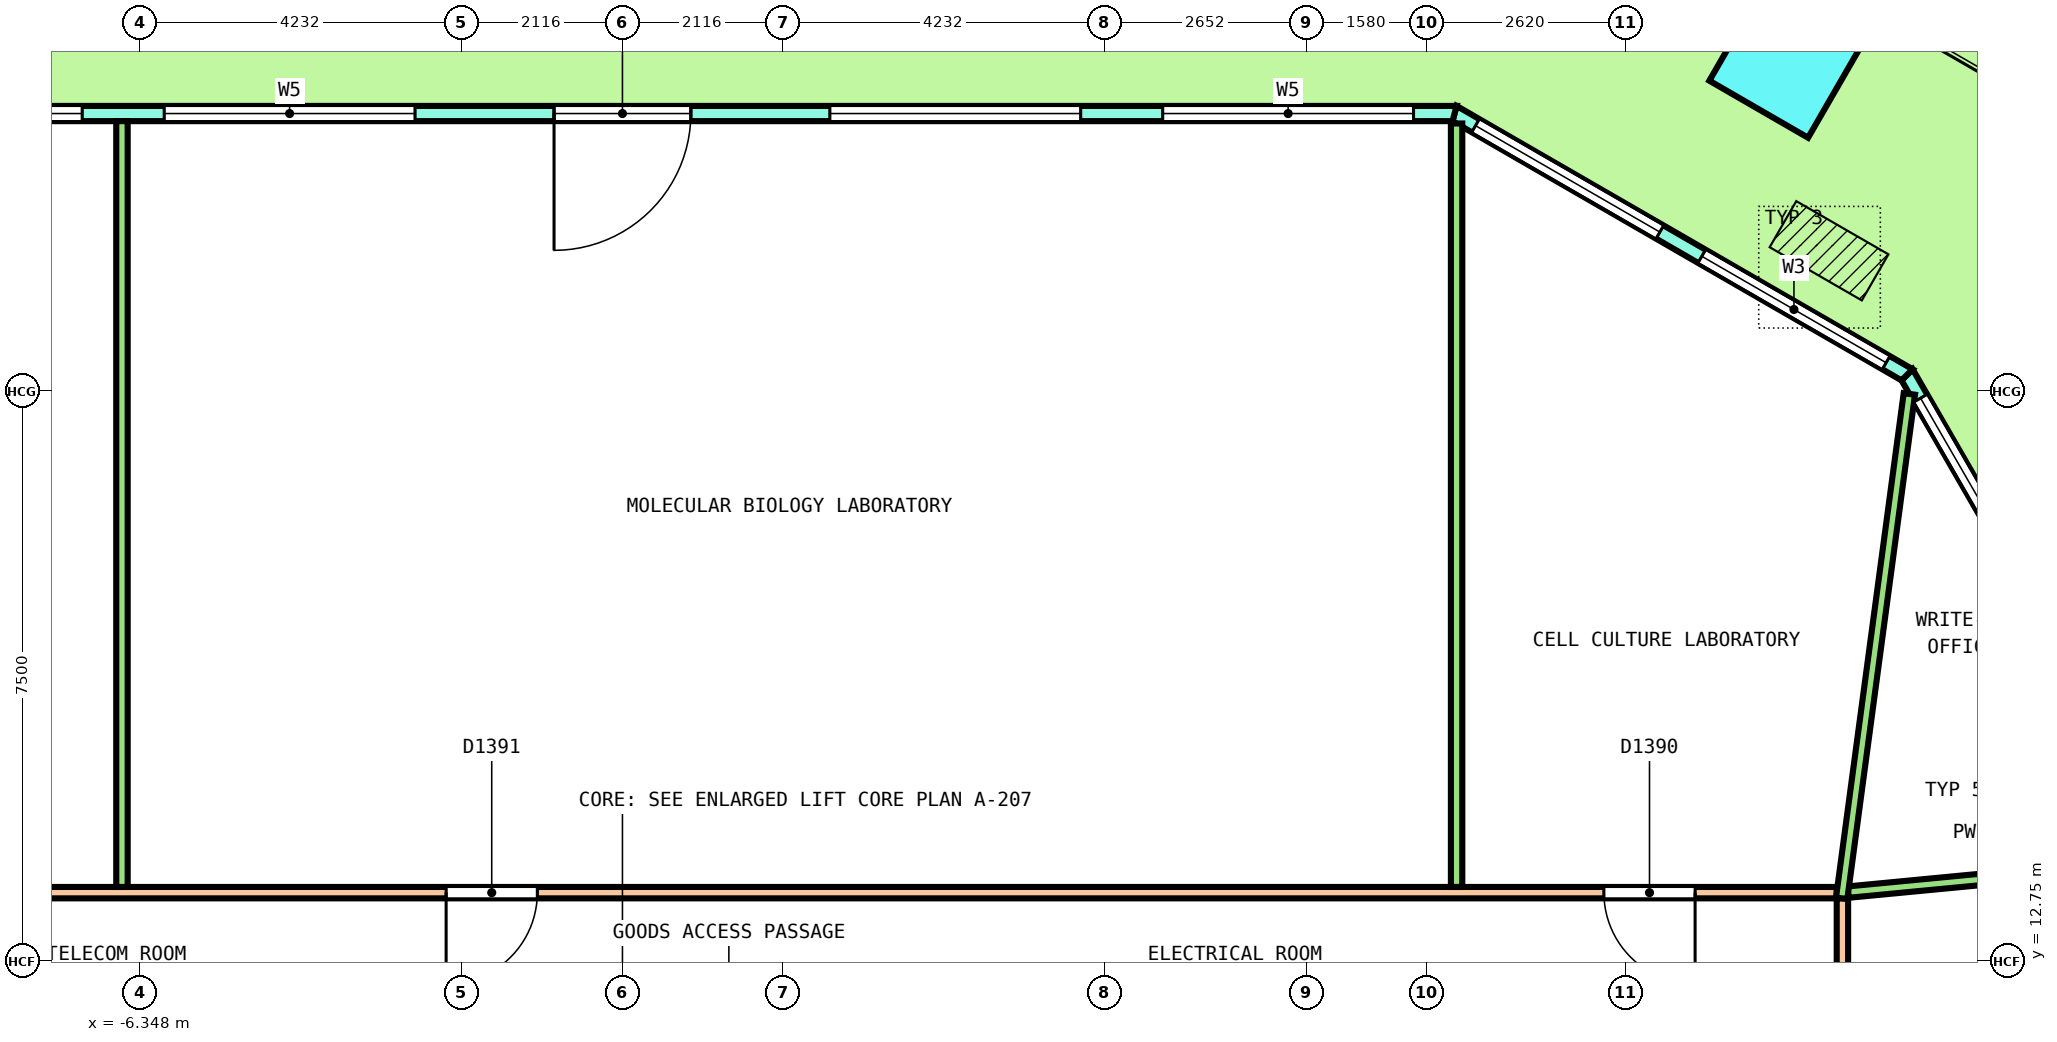
"""IFC4 building model, lengths in metres.
Left out: names, types, materials, properties, quantities, classifications, styles, units other than length and angle.
Written with IfcOpenShell. Run it as: python <this file> out.ifc"""

import sys

from ifc_helpers import new_model, si_unit, direction, frame, frame_2d, origin, origin_2d, place, context, subcontext, project, spatial, polyline, rectangle, outline, extrude, element, fill, save


model = new_model("IFC4")
c1 = context("Model", 3, precision=1e-05, world=origin(), true_north=direction((0.0, 1.0)))
c2 = subcontext(c1, "Body", "Model", "MODEL_VIEW")
j1 = project(units=[si_unit("LENGTHUNIT", "METRE"), si_unit("PLANEANGLEUNIT", "RADIAN")], contexts=[c1])
p1 = place(None, origin())
s1 = spatial("IfcSite", under=j1, at=p1, CompositionType="ELEMENT")
p2 = place(p1, origin())
s2 = spatial("IfcBuilding", under=s1, at=p2, CompositionType="ELEMENT")
p3 = place(p2, frame((0.0, 0.0, 45.4)))
s3 = spatial("IfcBuildingStorey", under=s2, at=p3, CompositionType="ELEMENT", Elevation=45.4)
p4 = place(p3, frame((15.324, 24.606, 0.0), z_axis=(0.036205074038, 0.0, 0.999344381389), x_axis=(-0.865315435316, 0.500246354177, 0.031349362627)))
e1 = element("IfcColumn", 1, at=p4, inside=s3, PredefinedType="COLUMN", context=c2, shape_type="SweptSolid", body=[
    extrude(rectangle(XDim=1.5, YDim=1.5, at=origin_2d()), origin(), (0.0, 0.0, 1.0), 4.053),
])
p5 = place(p3, frame((26.172, 4.405, 0.0), z_axis=(0.0, 0.0, 1.0), x_axis=(-0.500000942564, 0.866024859594, 0.0)))
e2 = element("IfcWall", 2, at=p5, inside=s3, PredefinedType="SOLIDWALL", context=c2, shape_type="SweptSolid", body=[
    extrude(outline(polyline([(-0.027, -0.1), (1.006, -0.1), (2.039, -0.1), (3.072, -0.1), (4.105, -0.1), (5.138, -0.1), (6.172, -0.1), (7.205, -0.1), (8.238, -0.1), (9.271, -0.1), (10.304, -0.1), (11.337, -0.1), (12.37, -0.1), (13.403, -0.1), (14.436, -0.1), (15.469, -0.1), (16.502, -0.1), (17.535, -0.1), (18.568, -0.1), (18.515, 0.1), (17.488, 0.1), (16.46, 0.1), (15.433, 0.1), (14.406, 0.1), (13.379, 0.1), (12.352, 0.1), (11.325, 0.1), (10.298, 0.1), (9.271, 0.1), (8.244, 0.1), (7.217, 0.1), (6.189, 0.1), (5.162, 0.1), (4.135, 0.1), (3.108, 0.1), (2.081, 0.1), (1.054, 0.1), (0.027, 0.1), (-0.027, -0.1)])), origin(), (0.0, 0.0, 1.0), 4.1),
])
p6 = place(p5, frame((0.354, 0.0, 0.1)))
e3 = element("IfcOpeningElement", 3, at=p6, cuts=e2, PredefinedType="OPENING", context=c2, shape_type="SweptSolid", body=[
    extrude(rectangle(XDim=3.0, YDim=2.9, at=frame_2d((1.5, 1.45))), frame((0.0, 0.11, 0.0), z_axis=(0.0, -1.0, 0.0), x_axis=(1.0, 0.0, 0.0)), (0.0, 0.0, 1.0), 0.22),
])
p7 = place(p5, frame((4.062, 0.0, 0.1)))
e4 = element("IfcOpeningElement", 4, at=p7, cuts=e2, PredefinedType="OPENING", context=c2, shape_type="SweptSolid", body=[
    extrude(rectangle(XDim=3.0, YDim=2.9, at=frame_2d((1.5, 1.45))), frame((0.0, 0.11, 0.0), z_axis=(0.0, -1.0, 0.0), x_axis=(1.0, 0.0, 0.0)), (0.0, 0.0, 1.0), 0.22),
])
p8 = place(p5, frame((8.371, 0.0, 0.0)))
e5 = element("IfcOpeningElement", 5, at=p8, cuts=e2, PredefinedType="OPENING", context=c2, shape_type="SweptSolid", body=[
    extrude(rectangle(XDim=1.8, YDim=2.4, at=frame_2d((0.9, 1.2))), frame((0.0, 0.11, 0.0), z_axis=(0.0, -1.0, 0.0), x_axis=(1.0, 0.0, 0.0)), (0.0, 0.0, 1.0), 0.22),
])
p9 = place(p5, frame((8.371, 0.0, 2.55)))
e6 = element("IfcOpeningElement", 6, at=p9, cuts=e2, PredefinedType="OPENING", context=c2, shape_type="SweptSolid", body=[
    extrude(rectangle(XDim=1.8, YDim=0.45, at=frame_2d((0.9, 0.225))), frame((0.0, 0.11, 0.0), z_axis=(0.0, -1.0, 0.0), x_axis=(1.0, 0.0, 0.0)), (0.0, 0.0, 1.0), 0.22),
])
p10 = place(p5, frame((11.479, 0.0, 0.1)))
e7 = element("IfcOpeningElement", 7, at=p10, cuts=e2, PredefinedType="OPENING", context=c2, shape_type="SweptSolid", body=[
    extrude(rectangle(XDim=3.0, YDim=2.9, at=frame_2d((1.5, 1.45))), frame((0.0, 0.11, 0.0), z_axis=(0.0, -1.0, 0.0), x_axis=(1.0, 0.0, 0.0)), (0.0, 0.0, 1.0), 0.22),
])
p11 = place(p5, frame((15.188, 0.0, 0.1)))
e8 = element("IfcOpeningElement", 8, at=p11, cuts=e2, PredefinedType="OPENING", context=c2, shape_type="SweptSolid", body=[
    extrude(rectangle(XDim=3.0, YDim=2.9, at=frame_2d((1.5, 1.45))), frame((0.0, 0.11, 0.0), z_axis=(0.0, -1.0, 0.0), x_axis=(1.0, 0.0, 0.0)), (0.0, 0.0, 1.0), 0.22),
])
p12 = place(p3, frame((16.901, 20.463, 0.0), z_axis=(0.0, 0.0, 1.0), x_axis=(-0.866029458321, 0.49999297727, 0.0)))
e9 = element("IfcWall", 9, at=p12, inside=s3, PredefinedType="SOLIDWALL", context=c2, shape_type="SweptSolid", body=[
    extrude(outline(polyline([(-0.027, -0.1), (1.128, -0.1), (2.282, -0.1), (3.437, -0.1), (4.592, -0.1), (5.747, -0.1), (6.901, -0.1), (6.848, 0.1), (5.711, 0.1), (4.574, 0.1), (3.437, 0.1), (2.301, 0.1), (1.164, 0.1), (0.027, 0.1), (-0.027, -0.1)])), origin(), (0.0, 0.0, 1.0), 4.1),
])
p13 = place(p12, frame((0.319, 0.0, 0.1)))
e10 = element("IfcOpeningElement", 10, at=p13, cuts=e9, PredefinedType="OPENING", context=c2, shape_type="SweptSolid", body=[
    extrude(rectangle(XDim=2.8, YDim=2.9, at=frame_2d((1.4, 1.45))), frame((0.0, 0.11, 0.0), z_axis=(0.0, -1.0, 0.0), x_axis=(1.0, 0.0, 0.0)), (0.0, 0.0, 1.0), 0.22),
])
p14 = place(p12, frame((3.756, 0.0, 0.1)))
e11 = element("IfcOpeningElement", 11, at=p14, cuts=e9, PredefinedType="OPENING", context=c2, shape_type="SweptSolid", body=[
    extrude(rectangle(XDim=2.8, YDim=2.9, at=frame_2d((1.4, 1.45))), frame((0.0, 0.11, 0.0), z_axis=(0.0, -1.0, 0.0), x_axis=(1.0, 0.0, 0.0)), (0.0, 0.0, 1.0), 0.22),
])
p15 = place(p3, frame((10.947, 23.9, 0.0), z_axis=(0.0, 0.0, 1.0), x_axis=(-1.0, 0.0, 0.0)))
e12 = element("IfcWall", 12, at=p15, inside=s3, PredefinedType="SOLIDWALL", context=c2, shape_type="SweptSolid", body=[
    extrude(outline(polyline([(-0.027, -0.1), (1.018, -0.1), (2.063, -0.1), (3.109, -0.1), (4.154, -0.1), (5.199, -0.1), (6.244, -0.1), (7.289, -0.1), (8.334, -0.1), (9.38, -0.1), (10.425, -0.1), (11.47, -0.1), (12.515, -0.1), (13.56, -0.1), (14.605, -0.1), (15.65, -0.1), (16.696, -0.1), (17.741, -0.1), (18.786, -0.1), (19.831, -0.1), (20.876, -0.1), (21.921, -0.1), (21.868, 0.1), (20.828, 0.1), (19.788, 0.1), (18.748, 0.1), (17.708, 0.1), (16.667, 0.1), (15.627, 0.1), (14.587, 0.1), (13.547, 0.1), (12.507, 0.1), (11.467, 0.1), (10.427, 0.1), (9.387, 0.1), (8.347, 0.1), (7.307, 0.1), (6.267, 0.1), (5.227, 0.1), (4.187, 0.1), (3.147, 0.1), (2.107, 0.1), (1.067, 0.1), (0.027, 0.1), (-0.027, -0.1)])), origin(), (0.0, 0.0, 1.0), 4.1),
])
p16 = place(p15, frame((0.54, 0.0, 0.1)))
e13 = element("IfcOpeningElement", 13, at=p16, cuts=e12, PredefinedType="OPENING", context=c2, shape_type="SweptSolid", body=[
    extrude(rectangle(XDim=3.3, YDim=2.9, at=frame_2d((1.65, 1.45))), frame((0.0, 0.11, 0.0), z_axis=(0.0, -1.0, 0.0), x_axis=(1.0, 0.0, 0.0)), (0.0, 0.0, 1.0), 0.22),
])
p17 = place(p15, frame((4.918, 0.0, 0.1)))
e14 = element("IfcOpeningElement", 14, at=p17, cuts=e12, PredefinedType="OPENING", context=c2, shape_type="SweptSolid", body=[
    extrude(rectangle(XDim=3.3, YDim=2.9, at=frame_2d((1.65, 1.45))), frame((0.0, 0.11, 0.0), z_axis=(0.0, -1.0, 0.0), x_axis=(1.0, 0.0, 0.0)), (0.0, 0.0, 1.0), 0.22),
])
p18 = place(p15, frame((10.047, 0.0, 0.0)))
e15 = element("IfcOpeningElement", 15, at=p18, cuts=e12, PredefinedType="OPENING", context=c2, shape_type="SweptSolid", body=[
    extrude(rectangle(XDim=1.8, YDim=2.4, at=frame_2d((0.9, 1.2))), frame((0.0, 0.11, 0.0), z_axis=(0.0, -1.0, 0.0), x_axis=(1.0, 0.0, 0.0)), (0.0, 0.0, 1.0), 0.22),
])
p19 = place(p15, frame((10.047, 0.0, 2.55)))
e16 = element("IfcOpeningElement", 16, at=p19, cuts=e12, PredefinedType="OPENING", context=c2, shape_type="SweptSolid", body=[
    extrude(rectangle(XDim=1.8, YDim=0.45, at=frame_2d((0.9, 0.225))), frame((0.0, 0.11, 0.0), z_axis=(0.0, -1.0, 0.0), x_axis=(1.0, 0.0, 0.0)), (0.0, 0.0, 1.0), 0.22),
])
p20 = place(p15, frame((13.676, 0.0, 0.1)))
e17 = element("IfcOpeningElement", 17, at=p20, cuts=e12, PredefinedType="OPENING", context=c2, shape_type="SweptSolid", body=[
    extrude(rectangle(XDim=3.3, YDim=2.9, at=frame_2d((1.65, 1.45))), frame((0.0, 0.11, 0.0), z_axis=(0.0, -1.0, 0.0), x_axis=(1.0, 0.0, 0.0)), (0.0, 0.0, 1.0), 0.22),
])
p21 = place(p15, frame((18.055, 0.0, 0.1)))
e18 = element("IfcOpeningElement", 18, at=p21, cuts=e12, PredefinedType="OPENING", context=c2, shape_type="SweptSolid", body=[
    extrude(rectangle(XDim=3.3, YDim=2.9, at=frame_2d((1.65, 1.45))), frame((0.0, 0.11, 0.0), z_axis=(0.0, -1.0, 0.0), x_axis=(1.0, 0.0, 0.0)), (0.0, 0.0, 1.0), 0.22),
])
p22 = place(p3, frame((16.05, -13.575, 0.0), z_axis=(0.0, 0.0, 1.0), x_axis=(0.0, 1.0, 0.0)))
e19 = element("IfcWall", 19, at=p22, inside=s3, PredefinedType="PARTITIONING", context=c2, shape_type="SweptSolid", body=[
    extrude(rectangle(XDim=27.15, YDim=0.15, at=frame_2d((13.575, 0.0))), origin(), (0.0, 0.0, 1.0), 3.05),
])
p23 = place(p22, frame((17.285, 0.0, 0.0)))
e20 = element("IfcOpeningElement", 20, at=p23, cuts=e19, PredefinedType="OPENING", context=c2, shape_type="SweptSolid", body=[
    extrude(rectangle(XDim=1.2, YDim=2.1, at=frame_2d((0.6, 1.05))), frame((0.0, 0.085, 0.0), z_axis=(0.0, -1.0, 0.0), x_axis=(1.0, 0.0, 0.0)), (0.0, 0.0, 1.0), 0.17),
])
p24 = place(p22, frame((23.726, 0.0, 0.0)))
e21 = element("IfcOpeningElement", 21, at=p24, cuts=e19, PredefinedType="OPENING", context=c2, shape_type="SweptSolid", body=[
    extrude(rectangle(XDim=1.0, YDim=2.1, at=frame_2d((0.5, 1.05))), frame((0.0, 0.085, 0.0), z_axis=(0.0, -1.0, 0.0), x_axis=(1.0, 0.0, 0.0)), (0.0, 0.0, 1.0), 0.17),
])
p25 = place(p22, frame((1.2, 0.0, 0.0)))
e22 = element("IfcOpeningElement", 22, at=p25, cuts=e19, PredefinedType="OPENING", context=c2, shape_type="SweptSolid", body=[
    extrude(rectangle(XDim=1.0, YDim=2.1, at=frame_2d((0.5, 1.05))), frame((0.0, 0.085, 0.0), z_axis=(0.0, -1.0, 0.0), x_axis=(1.0, 0.0, 0.0)), (0.0, 0.0, 1.0), 0.17),
])
p26 = place(p22, frame((10.701, 0.0, 0.0)))
e23 = element("IfcOpeningElement", 23, at=p26, cuts=e19, PredefinedType="OPENING", context=c2, shape_type="SweptSolid", body=[
    extrude(rectangle(XDim=1.2, YDim=2.1, at=frame_2d((0.6, 1.05))), frame((0.0, 0.085, 0.0), z_axis=(0.0, -1.0, 0.0), x_axis=(1.0, 0.0, 0.0)), (0.0, 0.0, 1.0), 0.17),
])
p27 = place(p3, frame((-15.975, 13.65, 0.0), z_axis=(0.0, 0.0, 1.0), x_axis=(1.0, 0.0, 0.0)))
e24 = element("IfcWall", 24, at=p27, inside=s3, PredefinedType="PARTITIONING", context=c2, shape_type="SweptSolid", body=[
    extrude(rectangle(XDim=31.95, YDim=0.15, at=frame_2d((15.975, 0.0))), origin(), (0.0, 0.0, 1.0), 3.05),
])
p28 = place(p27, frame((28.887, 0.0, 0.0)))
e25 = element("IfcOpeningElement", 25, at=p28, cuts=e24, PredefinedType="OPENING", context=c2, shape_type="SweptSolid", body=[
    extrude(rectangle(XDim=1.2, YDim=2.1, at=frame_2d((0.6, 1.05))), frame((0.0, 0.085, 0.0), z_axis=(0.0, -1.0, 0.0), x_axis=(1.0, 0.0, 0.0)), (0.0, 0.0, 1.0), 0.17),
])
p29 = place(p27, frame((13.655, 0.0, 0.0)))
e26 = element("IfcOpeningElement", 26, at=p29, cuts=e24, PredefinedType="OPENING", context=c2, shape_type="SweptSolid", body=[
    extrude(rectangle(XDim=1.2, YDim=2.1, at=frame_2d((0.6, 1.05))), frame((0.0, 0.085, 0.0), z_axis=(0.0, -1.0, 0.0), x_axis=(1.0, 0.0, 0.0)), (0.0, 0.0, 1.0), 0.17),
])
p30 = place(p27, frame((6.468, 0.0, 0.0)))
e27 = element("IfcOpeningElement", 27, at=p30, cuts=e24, PredefinedType="OPENING", context=c2, shape_type="SweptSolid", body=[
    extrude(rectangle(XDim=1.2, YDim=2.1, at=frame_2d((0.6, 1.05))), frame((0.0, 0.085, 0.0), z_axis=(0.0, -1.0, 0.0), x_axis=(1.0, 0.0, 0.0)), (0.0, 0.0, 1.0), 0.17),
])
p31 = place(p27, frame((0.406, 0.0, 0.0)))
e28 = element("IfcOpeningElement", 28, at=p31, cuts=e24, PredefinedType="OPENING", context=c2, shape_type="SweptSolid", body=[
    extrude(rectangle(XDim=1.0, YDim=2.1, at=frame_2d((0.5, 1.05))), frame((0.0, 0.085, 0.0), z_axis=(0.0, -1.0, 0.0), x_axis=(1.0, 0.0, 0.0)), (0.0, 0.0, 1.0), 0.17),
])
p32 = place(p3, frame((16.125, 13.657, 0.0), z_axis=(0.0, 0.0, 1.0), x_axis=(0.995446624289, 0.095320607378, 0.0)))
e29 = element("IfcWall", 29, at=p32, inside=s3, PredefinedType="PARTITIONING", context=c2, shape_type="SweptSolid", body=[
    extrude(rectangle(XDim=4.369, YDim=0.15, at=frame_2d((2.185, 0.0))), origin(), (0.0, 0.0, 1.0), 3.05),
])
p33 = place(p32, frame((2.059, 0.0, 0.0)))
e30 = element("IfcOpeningElement", 30, at=p33, cuts=e29, PredefinedType="OPENING", context=c2, shape_type="SweptSolid", body=[
    extrude(rectangle(XDim=1.0, YDim=2.1, at=frame_2d((0.5, 1.05))), frame((0.0, 0.085, 0.0), z_axis=(0.0, -1.0, 0.0), x_axis=(1.0, 0.0, 0.0)), (0.0, 0.0, 1.0), 0.17),
])
p34 = place(p3, frame((16.04, 13.576, 0.0), z_axis=(0.0, 0.0, 1.0), x_axis=(0.132992525373, 0.991117040614, 0.0)))
e31 = element("IfcWall", 31, at=p34, inside=s3, PredefinedType="PARTITIONING", context=c2, shape_type="SweptSolid", body=[
    extrude(rectangle(XDim=6.695, YDim=0.15, at=frame_2d((3.348, 0.0))), origin(), (0.0, 0.0, 1.0), 3.05),
])
p35 = place(p3, frame((10.974, 13.725, 0.0), z_axis=(0.0, 0.0, 1.0), x_axis=(0.0, 1.0, 0.0)))
e32 = element("IfcWall", 32, at=p35, inside=s3, PredefinedType="PARTITIONING", context=c2, shape_type="SweptSolid", body=[
    extrude(rectangle(XDim=10.044, YDim=0.15, at=frame_2d((5.022, 0.0))), origin(), (0.0, 0.0, 1.0), 3.05),
])
p36 = place(p3, frame((-6.584, 13.725, 0.0), z_axis=(0.0, 0.0, 1.0), x_axis=(0.0, 1.0, 0.0)))
e33 = element("IfcWall", 33, at=p36, inside=s3, PredefinedType="PARTITIONING", context=c2, shape_type="SweptSolid", body=[
    extrude(rectangle(XDim=10.075, YDim=0.15, at=frame_2d((5.038, 0.0))), origin(), (0.0, 0.0, 1.0), 3.05),
])
p37 = place(p11, origin())
e34 = element("IfcWindow", 34, at=p37, inside=s3, PartitioningType="SINGLE_PANEL", PredefinedType="WINDOW", context=c2, shape_type="SweptSolid", body=[
    extrude(rectangle(XDim=3.0, YDim=2.9, at=frame_2d((1.5, 1.45))), frame((0.0, 0.03, 0.0), z_axis=(0.0, -1.0, 0.0), x_axis=(1.0, 0.0, 0.0)), (0.0, 0.0, 1.0), 0.06),
])
fill(e8, e34)
p38 = place(p13, origin())
e35 = element("IfcWindow", 35, at=p38, inside=s3, PartitioningType="SINGLE_PANEL", PredefinedType="WINDOW", context=c2, shape_type="SweptSolid", body=[
    extrude(rectangle(XDim=2.8, YDim=2.9, at=frame_2d((1.4, 1.45))), frame((0.0, 0.03, 0.0), z_axis=(0.0, -1.0, 0.0), x_axis=(1.0, 0.0, 0.0)), (0.0, 0.0, 1.0), 0.06),
])
fill(e10, e35)
p39 = place(p14, origin())
e36 = element("IfcWindow", 36, at=p39, inside=s3, PartitioningType="SINGLE_PANEL", PredefinedType="WINDOW", context=c2, shape_type="SweptSolid", body=[
    extrude(rectangle(XDim=2.8, YDim=2.9, at=frame_2d((1.4, 1.45))), frame((0.0, 0.03, 0.0), z_axis=(0.0, -1.0, 0.0), x_axis=(1.0, 0.0, 0.0)), (0.0, 0.0, 1.0), 0.06),
])
fill(e11, e36)
p40 = place(p16, origin())
e37 = element("IfcWindow", 37, at=p40, inside=s3, PartitioningType="SINGLE_PANEL", PredefinedType="WINDOW", context=c2, shape_type="SweptSolid", body=[
    extrude(rectangle(XDim=3.3, YDim=2.9, at=frame_2d((1.65, 1.45))), frame((0.0, 0.03, 0.0), z_axis=(0.0, -1.0, 0.0), x_axis=(1.0, 0.0, 0.0)), (0.0, 0.0, 1.0), 0.06),
])
fill(e13, e37)
p41 = place(p17, origin())
e38 = element("IfcWindow", 38, at=p41, inside=s3, PartitioningType="SINGLE_PANEL", PredefinedType="WINDOW", context=c2, shape_type="SweptSolid", body=[
    extrude(rectangle(XDim=3.3, YDim=2.9, at=frame_2d((1.65, 1.45))), frame((0.0, 0.03, 0.0), z_axis=(0.0, -1.0, 0.0), x_axis=(1.0, 0.0, 0.0)), (0.0, 0.0, 1.0), 0.06),
])
fill(e14, e38)
p42 = place(p18, origin())
e39 = element("IfcDoor", 39, at=p42, inside=s3, OperationType="DOUBLE_DOOR_SINGLE_SWING", PredefinedType="DOOR", context=c2, shape_type="SweptSolid", body=[
    extrude(rectangle(XDim=1.8, YDim=2.4, at=frame_2d((0.9, 1.2))), frame((0.0, 0.025, 0.0), z_axis=(0.0, -1.0, 0.0), x_axis=(1.0, 0.0, 0.0)), (0.0, 0.0, 1.0), 0.05),
])
fill(e15, e39)
p43 = place(p19, origin())
e40 = element("IfcWindow", 40, at=p43, inside=s3, PartitioningType="SINGLE_PANEL", PredefinedType="WINDOW", context=c2, shape_type="SweptSolid", body=[
    extrude(rectangle(XDim=1.8, YDim=0.45, at=frame_2d((0.9, 0.225))), frame((0.0, 0.03, 0.0), z_axis=(0.0, -1.0, 0.0), x_axis=(1.0, 0.0, 0.0)), (0.0, 0.0, 1.0), 0.06),
])
fill(e16, e40)
p44 = place(p20, origin())
e41 = element("IfcWindow", 41, at=p44, inside=s3, PartitioningType="SINGLE_PANEL", PredefinedType="WINDOW", context=c2, shape_type="SweptSolid", body=[
    extrude(rectangle(XDim=3.3, YDim=2.9, at=frame_2d((1.65, 1.45))), frame((0.0, 0.03, 0.0), z_axis=(0.0, -1.0, 0.0), x_axis=(1.0, 0.0, 0.0)), (0.0, 0.0, 1.0), 0.06),
])
fill(e17, e41)
p45 = place(p21, origin())
e42 = element("IfcWindow", 42, at=p45, inside=s3, PartitioningType="SINGLE_PANEL", PredefinedType="WINDOW", context=c2, shape_type="SweptSolid", body=[
    extrude(rectangle(XDim=3.3, YDim=2.9, at=frame_2d((1.65, 1.45))), frame((0.0, 0.03, 0.0), z_axis=(0.0, -1.0, 0.0), x_axis=(1.0, 0.0, 0.0)), (0.0, 0.0, 1.0), 0.06),
])
fill(e18, e42)
p46 = place(p28, origin())
e43 = element("IfcDoor", 43, at=p46, inside=s3, OperationType="DOUBLE_DOOR_SINGLE_SWING", PredefinedType="DOOR", context=c2, shape_type="SweptSolid", body=[
    extrude(rectangle(XDim=1.2, YDim=2.1, at=frame_2d((0.6, 1.05))), frame((0.0, 0.025, 0.0), z_axis=(0.0, -1.0, 0.0), x_axis=(1.0, 0.0, 0.0)), (0.0, 0.0, 1.0), 0.05),
])
fill(e25, e43)
p47 = place(p29, origin())
e44 = element("IfcDoor", 44, at=p47, inside=s3, OperationType="DOUBLE_DOOR_SINGLE_SWING", PredefinedType="DOOR", context=c2, shape_type="SweptSolid", body=[
    extrude(rectangle(XDim=1.2, YDim=2.1, at=frame_2d((0.6, 1.05))), frame((0.0, 0.025, 0.0), z_axis=(0.0, -1.0, 0.0), x_axis=(1.0, 0.0, 0.0)), (0.0, 0.0, 1.0), 0.05),
])
fill(e26, e44)
save(model, sys.argv[1])
